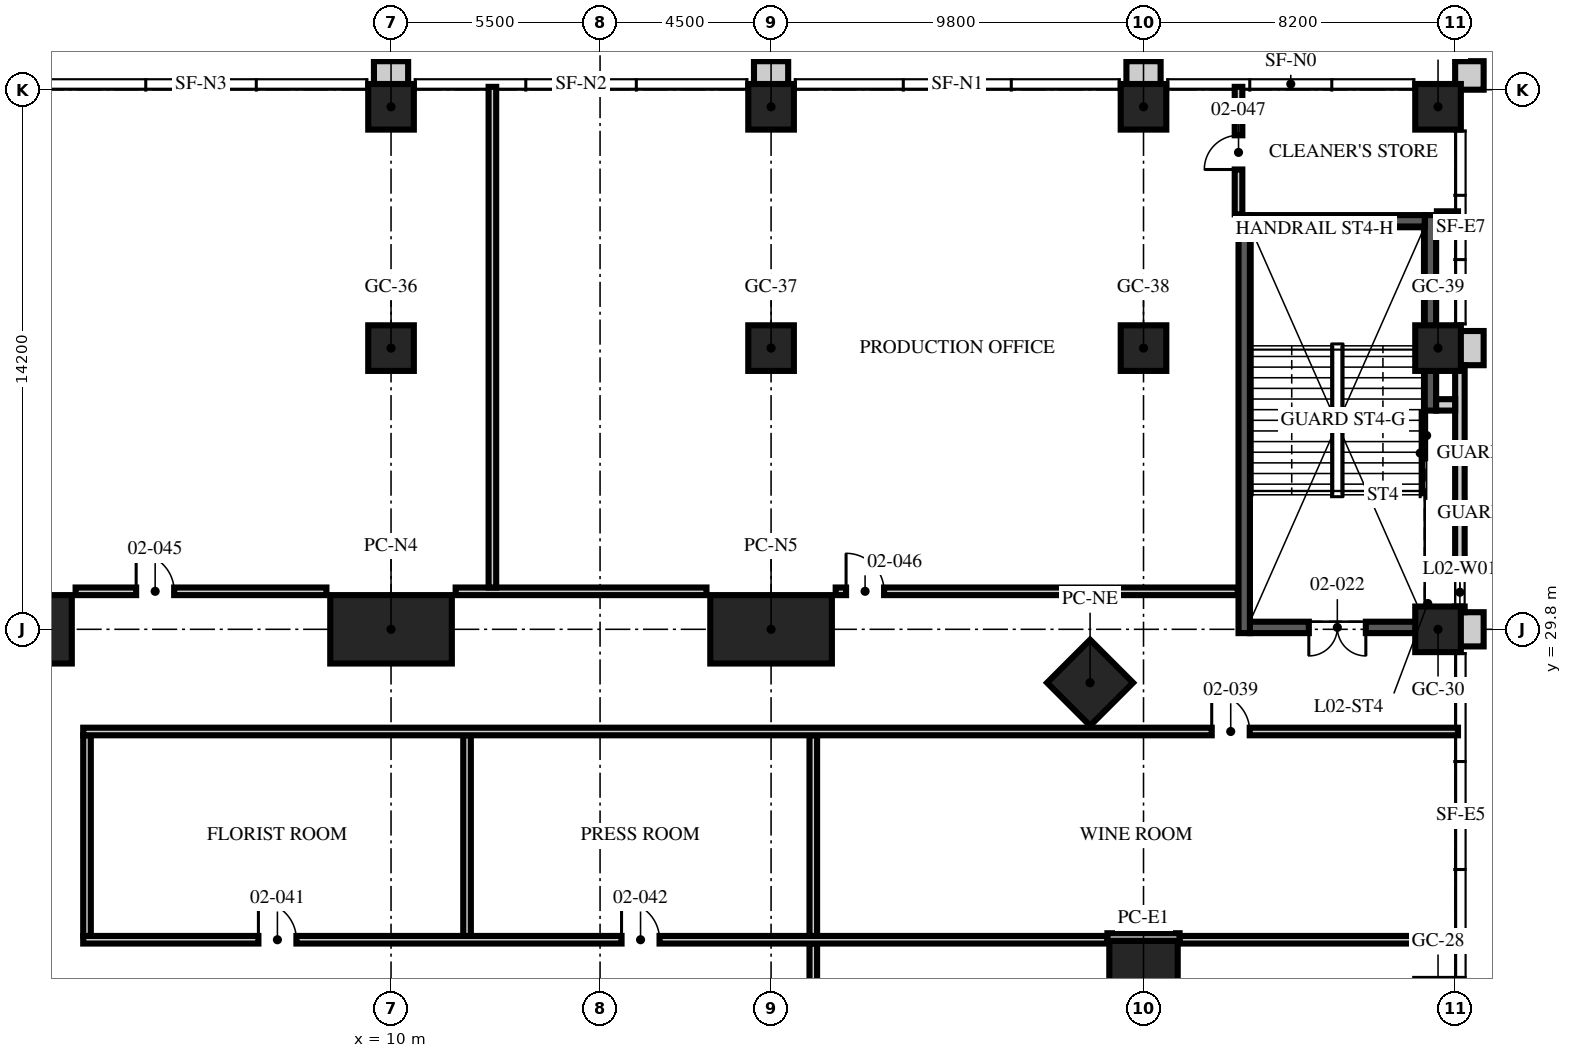
"""IFC4 building model, lengths in metres.
Left out: names, types, materials, properties, quantities, classifications, styles, units other than length and angle.
Written with IfcOpenShell. Run it as: python <this file> out.ifc"""

import sys

from ifc_helpers import new_model, si_unit, direction, frame, frame_2d, origin, origin_2d, place, context, subcontext, project, spatial, rectangle, hollow_rectangle, extrude, element, fill, save


model = new_model("IFC4")
c1 = context("Model", 3, precision=1e-05, world=origin(), true_north=direction((0.0, 1.0)))
c2 = subcontext(c1, "Body", "Model", "MODEL_VIEW")
j1 = project(units=[si_unit("LENGTHUNIT", "METRE"), si_unit("PLANEANGLEUNIT", "RADIAN")], contexts=[c1])
p1 = place(None, origin())
s1 = spatial("IfcSite", under=j1, at=p1, CompositionType="ELEMENT")
p2 = place(p1, origin())
s2 = spatial("IfcBuilding", under=s1, at=p2, CompositionType="ELEMENT")
p3 = place(p2, frame((0.0, 0.0, 11.0)))
s3 = spatial("IfcBuildingStorey", under=s2, at=p3, CompositionType="ELEMENT", Elevation=11.0)
for number, where, z_axis, x_axis in (
    (1, (0.0, 29.8, 0.0), (0.0, 0.0, 1.0), (1.0, 0.0, 0.0)),
    (2, (10.0, 29.8, 0.0), (0.0, 0.0, 1.0), (1.0, 0.0, 0.0)),
    (3, (20.0, 29.8, 0.0), (0.0, 0.0, 1.0), (1.0, 0.0, 0.0)),
    (4, (29.8, 20.0, 0.0), (0.0, 0.0, 1.0), (0.0, 1.0, 0.0)),
):
    element("IfcColumn", number, at=place(p3, frame(where, z_axis=z_axis, x_axis=x_axis)), inside=s3, PredefinedType="COLUMN", context=c2, shape_type="SweptSolid", body=[
        extrude(hollow_rectangle(XDim=3.2, YDim=1.8, WallThickness=0.2, at=origin_2d()), origin(), (0.0, 0.0, 1.0), 5.0),
    ])
p4 = place(p3, frame((28.394, 28.394, 0.0), z_axis=(0.0, 0.0, 1.0), x_axis=(0.707106781187, -0.707106781187, 0.0)))
e5 = element("IfcColumn", 5, at=p4, inside=s3, PredefinedType="COLUMN", context=c2, shape_type="SweptSolid", body=[
    extrude(hollow_rectangle(XDim=1.6, YDim=1.6, WallThickness=0.1, at=origin_2d()), origin(), (0.0, 0.0, 1.0), 5.0),
])
for number, where, z_axis, x_axis in (
    (6, (37.55, 29.8, 0.0), (0.0, 0.0, 1.0), (1.0, 0.0, 0.0)),
    (7, (10.0, 37.2, 0.0), (0.0, 0.0, 1.0), (1.0, 0.0, 0.0)),
    (8, (20.0, 37.2, 0.0), (0.0, 0.0, 1.0), (1.0, 0.0, 0.0)),
    (9, (29.8, 37.2, 0.0), (0.0, 0.0, 1.0), (1.0, 0.0, 0.0)),
    (10, (37.55, 37.2, 0.0), (0.0, 0.0, 1.0), (1.0, 0.0, 0.0)),
    (11, (10.0, 43.55, 0.0), (0.0, 0.0, 1.0), (1.0, 0.0, 0.0)),
    (12, (20.0, 43.55, 0.0), (0.0, 0.0, 1.0), (1.0, 0.0, 0.0)),
    (13, (29.8, 43.55, 0.0), (0.0, 0.0, 1.0), (1.0, 0.0, 0.0)),
    (14, (37.55, 43.55, 0.0), (0.0, 0.0, 1.0), (1.0, 0.0, 0.0)),
):
    element("IfcColumn", number, at=place(p3, frame(where, z_axis=z_axis, x_axis=x_axis)), inside=s3, PredefinedType="COLUMN", context=c2, shape_type="SweptSolid", body=[
        extrude(rectangle(XDim=1.2, YDim=1.2, at=origin_2d()), origin(), (0.0, 0.0, 1.0), 5.0),
    ])
for number, where, z_axis, x_axis in (
    (15, (38.375, 29.35, 0.0), (0.0, 0.0, 1.0), (0.0, 1.0, 0.0)),
    (16, (38.375, 36.75, 0.0), (0.0, 0.0, 1.0), (0.0, 1.0, 0.0)),
):
    element("IfcWall", number, at=place(p3, frame(where, z_axis=z_axis, x_axis=x_axis)), inside=s3, PredefinedType="SOLIDWALL", context=c2, shape_type="SweptSolid", body=[
        extrude(rectangle(XDim=0.9, YDim=0.75, at=frame_2d((0.45, 0.0))), origin(), (0.0, 0.0, 1.0), 5.0),
    ])
p5 = place(p3, frame((38.375, 44.0, 0.0), z_axis=(0.0, 0.0, 1.0), x_axis=(0.0, 1.0, 0.0)))
e17 = element("IfcWall", 17, at=p5, inside=s3, PredefinedType="SOLIDWALL", context=c2, shape_type="SweptSolid", body=[
    extrude(rectangle(XDim=0.75, YDim=0.75, at=frame_2d((0.375, 0.0))), origin(), (0.0, 0.0, 1.0), 5.0),
])
p6 = place(p3, frame((38.125, 30.25, 0.0), z_axis=(0.0, 0.0, 1.0), x_axis=(0.0, 1.0, 0.0)))
e18 = element("IfcWall", 18, at=p6, inside=s3, PredefinedType="SOLIDWALL", context=c2, shape_type="SweptSolid", body=[
    extrude(rectangle(XDim=6.5, YDim=0.25, at=frame_2d((3.25, 0.0))), origin(), (0.0, 0.0, 1.0), 5.0),
])
p7 = place(p6, frame((0.15, 0.0, 1.2)))
e19 = element("IfcOpeningElement", 19, at=p7, cuts=e18, PredefinedType="OPENING", context=c2, shape_type="SweptSolid", body=[
    extrude(rectangle(XDim=0.75, YDim=1.7, at=frame_2d((0.375, 0.85))), frame((0.0, 0.135, 0.0), z_axis=(0.0, -1.0, 0.0), x_axis=(1.0, 0.0, 0.0)), (0.0, 0.0, 1.0), 0.27),
])
for number, where, z_axis, x_axis in (
    (20, (30.25, 44.375, 0.0), (0.0, 0.0, 1.0), (-1.0, 0.0, 0.0)),
    (21, (20.45, 44.375, 0.0), (0.0, 0.0, 1.0), (-1.0, 0.0, 0.0)),
    (22, (10.45, 44.375, 0.0), (0.0, 0.0, 1.0), (-1.0, 0.0, 0.0)),
):
    element("IfcWall", number, at=place(p3, frame(where, z_axis=z_axis, x_axis=x_axis)), inside=s3, PredefinedType="SOLIDWALL", context=c2, shape_type="SweptSolid", body=[
        extrude(rectangle(XDim=0.9, YDim=0.75, at=frame_2d((0.45, 0.0))), origin(), (0.0, 0.0, 1.0), 5.0),
    ])
p8 = place(p3, frame((37.35, 35.556, 0.0), z_axis=(0.0, 0.0, 1.0), x_axis=(0.0, 1.0, 0.0)))
e23 = element("IfcWall", 23, at=p8, inside=s3, PredefinedType="SOLIDWALL", context=c2, shape_type="SweptSolid", body=[
    extrude(rectangle(XDim=5.144, YDim=0.3, at=frame_2d((2.572, 0.0))), origin(), (0.0, 0.0, 1.0), 4.7),
])
p9 = place(p3, frame((38.0, 35.706, 0.0), z_axis=(0.0, 0.0, 1.0), x_axis=(-1.0, 0.0, 0.0)))
e24 = element("IfcWall", 24, at=p9, inside=s3, PredefinedType="PARTITIONING", context=c2, shape_type="SweptSolid", body=[
    extrude(rectangle(XDim=0.5, YDim=0.3, at=frame_2d((0.25, 0.0))), origin(), (0.0, 0.0, 1.0), 3.27),
])
p10 = place(p3, frame((38.0, 29.85, 0.0), z_axis=(0.0, 0.0, 1.0), x_axis=(-1.0, 0.0, 0.0)))
e25 = element("IfcWall", 25, at=p10, inside=s3, PredefinedType="SOLIDWALL", context=c2, shape_type="SweptSolid", body=[
    extrude(rectangle(XDim=5.4, YDim=0.3, at=frame_2d((2.7, 0.0))), origin(), (0.0, 0.0, 1.0), 4.7),
])
p11 = place(p10, frame((2.35, 0.0, 0.0)))
e26 = element("IfcOpeningElement", 26, at=p11, cuts=e25, PredefinedType="OPENING", context=c2, shape_type="SweptSolid", body=[
    extrude(rectangle(XDim=1.5, YDim=2.1, at=frame_2d((0.75, 1.05))), frame((0.0, 0.16, 0.0), z_axis=(0.0, -1.0, 0.0), x_axis=(1.0, 0.0, 0.0)), (0.0, 0.0, 1.0), 0.32),
])
p12 = place(p3, frame((32.45, 29.7, 0.0), z_axis=(0.0, 0.0, 1.0), x_axis=(0.0, 1.0, 0.0)))
e27 = element("IfcWall", 27, at=p12, inside=s3, PredefinedType="SOLIDWALL", context=c2, shape_type="SweptSolid", body=[
    extrude(rectangle(XDim=11.0, YDim=0.3, at=frame_2d((5.5, 0.0))), origin(), (0.0, 0.0, 1.0), 4.7),
])
p13 = place(p3, frame((37.2, 40.55, 0.0), z_axis=(0.0, 0.0, 1.0), x_axis=(-1.0, 0.0, 0.0)))
e28 = element("IfcWall", 28, at=p13, inside=s3, PredefinedType="SOLIDWALL", context=c2, shape_type="SweptSolid", body=[
    extrude(rectangle(XDim=4.6, YDim=0.3, at=frame_2d((2.3, 0.0))), origin(), (0.0, 0.0, 1.0), 4.7),
])
p14 = place(p3, frame((21.111, -20.491, 0.0), z_axis=(0.0, 0.0, 1.0), x_axis=(0.0, 1.0, 0.0)))
e29 = element("IfcWall", 29, at=p14, inside=s3, PredefinedType="SOLIDWALL", context=c2, shape_type="SweptSolid", body=[
    extrude(rectangle(XDim=42.022, YDim=0.2, at=frame_2d((21.011, 0.0))), origin(), (0.0, 0.0, 1.0), 3.5),
])
p15 = place(p14, frame((4.88, 0.0, 0.0)))
e30 = element("IfcOpeningElement", 30, at=p15, cuts=e29, PredefinedType="OPENING", context=c2, shape_type="SweptSolid", body=[
    extrude(rectangle(XDim=1.0, YDim=2.1, at=frame_2d((0.5, 1.05))), frame((0.0, 0.11, 0.0), z_axis=(0.0, -1.0, 0.0), x_axis=(1.0, 0.0, 0.0)), (0.0, 0.0, 1.0), 0.22),
])
p16 = place(p14, frame((16.064, 0.0, 0.0)))
e31 = element("IfcOpeningElement", 31, at=p16, cuts=e29, PredefinedType="OPENING", context=c2, shape_type="SweptSolid", body=[
    extrude(rectangle(XDim=1.0, YDim=2.1, at=frame_2d((0.5, 1.05))), frame((0.0, 0.11, 0.0), z_axis=(0.0, -1.0, 0.0), x_axis=(1.0, 0.0, 0.0)), (0.0, 0.0, 1.0), 0.22),
])
p17 = place(p14, frame((31.696, 0.0, 0.0)))
e32 = element("IfcOpeningElement", 32, at=p17, cuts=e29, PredefinedType="OPENING", context=c2, shape_type="SweptSolid", body=[
    extrude(rectangle(XDim=1.0, YDim=2.1, at=frame_2d((0.5, 1.05))), frame((0.0, 0.11, 0.0), z_axis=(0.0, -1.0, 0.0), x_axis=(1.0, 0.0, 0.0)), (0.0, 0.0, 1.0), 0.22),
])
p18 = place(p3, frame((1.9, 21.631, 0.0), z_axis=(0.0, 0.0, 1.0), x_axis=(1.0, 0.0, 0.0)))
e33 = element("IfcWall", 33, at=p18, inside=s3, PredefinedType="SOLIDWALL", context=c2, shape_type="SweptSolid", body=[
    extrude(rectangle(XDim=26.95, YDim=0.2, at=frame_2d((13.475, 0.0))), origin(), (0.0, 0.0, 1.0), 3.5),
])
p19 = place(p18, frame((4.61, 0.0, 0.0)))
e34 = element("IfcOpeningElement", 34, at=p19, cuts=e33, PredefinedType="OPENING", context=c2, shape_type="SweptSolid", body=[
    extrude(rectangle(XDim=1.0, YDim=2.1, at=frame_2d((0.5, 1.05))), frame((0.0, 0.11, 0.0), z_axis=(0.0, -1.0, 0.0), x_axis=(1.0, 0.0, 0.0)), (0.0, 0.0, 1.0), 0.22),
])
p20 = place(p18, frame((14.166, 0.0, 0.0)))
e35 = element("IfcOpeningElement", 35, at=p20, cuts=e33, PredefinedType="OPENING", context=c2, shape_type="SweptSolid", body=[
    extrude(rectangle(XDim=1.0, YDim=2.1, at=frame_2d((0.5, 1.05))), frame((0.0, 0.11, 0.0), z_axis=(0.0, -1.0, 0.0), x_axis=(1.0, 0.0, 0.0)), (0.0, 0.0, 1.0), 0.22),
])
p21 = place(p3, frame((30.75, 21.631, 0.0), z_axis=(0.0, 0.0, 1.0), x_axis=(1.0, 0.0, 0.0)))
e36 = element("IfcWall", 36, at=p21, inside=s3, PredefinedType="SOLIDWALL", context=c2, shape_type="SweptSolid", body=[
    extrude(rectangle(XDim=7.325, YDim=0.2, at=frame_2d((3.663, 0.0))), origin(), (0.0, 0.0, 1.0), 3.7),
])
p22 = place(p3, frame((28.85, 21.702, 0.0), z_axis=(0.0, 0.0, 1.0), x_axis=(1.0, 0.0, 0.0)))
e37 = element("IfcWall", 37, at=p22, inside=s3, PredefinedType="SOLIDWALL", context=c2, shape_type="SweptSolid", body=[
    extrude(rectangle(XDim=1.9, YDim=0.2, at=frame_2d((0.95, 0.0))), origin(), (0.0, 0.0, 1.0), 3.7),
])
for number, where, z_axis, x_axis in (
    (38, (2.0, 21.731, 0.0), (0.0, 0.0, 1.0), (0.0, 1.0, 0.0)),
    (39, (12.0, 21.731, 0.0), (0.0, 0.0, 1.0), (0.0, 1.0, 0.0)),
    (40, (21.111, 21.731, 0.0), (0.0, 0.0, 1.0), (0.0, 1.0, 0.0)),
):
    element("IfcWall", number, at=place(p3, frame(where, z_axis=z_axis, x_axis=x_axis)), inside=s3, PredefinedType="SOLIDWALL", context=c2, shape_type="SweptSolid", body=[
        extrude(rectangle(XDim=5.28, YDim=0.2, at=frame_2d((2.64, 0.0))), origin(), (0.0, 0.0, 1.0), 4.7),
    ])
p23 = place(p3, frame((1.9, 27.111, 0.0), z_axis=(0.0, 0.0, 1.0), x_axis=(1.0, 0.0, 0.0)))
e41 = element("IfcWall", 41, at=p23, inside=s3, PredefinedType="SOLIDWALL", context=c2, shape_type="SweptSolid", body=[
    extrude(rectangle(XDim=36.175, YDim=0.2, at=frame_2d((18.087, 0.0))), origin(), (0.0, 0.0, 1.0), 3.5),
])
p24 = place(p23, frame((29.695, 0.0, 0.0)))
e42 = element("IfcOpeningElement", 42, at=p24, cuts=e41, PredefinedType="OPENING", context=c2, shape_type="SweptSolid", body=[
    extrude(rectangle(XDim=1.0, YDim=2.1, at=frame_2d((0.5, 1.05))), frame((0.0, 0.11, 0.0), z_axis=(0.0, -1.0, 0.0), x_axis=(1.0, 0.0, 0.0)), (0.0, 0.0, 1.0), 0.22),
])
p25 = place(p3, frame((1.7, 30.8, 0.0), z_axis=(0.0, 0.0, 1.0), x_axis=(1.0, 0.0, 0.0)))
e43 = element("IfcWall", 43, at=p25, inside=s3, PredefinedType="SOLIDWALL", context=c2, shape_type="SweptSolid", body=[
    extrude(rectangle(XDim=6.6, YDim=0.2, at=frame_2d((3.3, 0.0))), origin(), (0.0, 0.0, 1.0), 4.7),
])
p26 = place(p25, frame((1.593, 0.0, 0.0)))
e44 = element("IfcOpeningElement", 44, at=p26, cuts=e43, PredefinedType="OPENING", context=c2, shape_type="SweptSolid", body=[
    extrude(rectangle(XDim=1.0, YDim=2.1, at=frame_2d((0.5, 1.05))), frame((0.0, 0.11, 0.0), z_axis=(0.0, -1.0, 0.0), x_axis=(1.0, 0.0, 0.0)), (0.0, 0.0, 1.0), 0.22),
])
p27 = place(p3, frame((11.7, 30.8, 0.0), z_axis=(0.0, 0.0, 1.0), x_axis=(1.0, 0.0, 0.0)))
e45 = element("IfcWall", 45, at=p27, inside=s3, PredefinedType="SOLIDWALL", context=c2, shape_type="SweptSolid", body=[
    extrude(rectangle(XDim=6.6, YDim=0.2, at=frame_2d((3.3, 0.0))), origin(), (0.0, 0.0, 1.0), 4.7),
])
p28 = place(p3, frame((21.7, 30.8, 0.0), z_axis=(0.0, 0.0, 1.0), x_axis=(1.0, 0.0, 0.0)))
e46 = element("IfcWall", 46, at=p28, inside=s3, PredefinedType="SOLIDWALL", context=c2, shape_type="SweptSolid", body=[
    extrude(rectangle(XDim=10.58, YDim=0.2, at=frame_2d((5.29, 0.0))), origin(), (0.0, 0.0, 1.0), 4.7),
])
p29 = place(p28, frame((0.273, 0.0, 0.0)))
e47 = element("IfcOpeningElement", 47, at=p29, cuts=e46, PredefinedType="OPENING", context=c2, shape_type="SweptSolid", body=[
    extrude(rectangle(XDim=1.0, YDim=2.1, at=frame_2d((0.5, 1.05))), frame((0.0, 0.11, 0.0), z_axis=(0.0, -1.0, 0.0), x_axis=(1.0, 0.0, 0.0)), (0.0, 0.0, 1.0), 0.22),
])
p30 = place(p3, frame((12.667, 30.9, 0.0), z_axis=(0.0, 0.0, 1.0), x_axis=(0.0, 1.0, 0.0)))
e48 = element("IfcWall", 48, at=p30, inside=s3, PredefinedType="SOLIDWALL", context=c2, shape_type="SweptSolid", body=[
    extrude(rectangle(XDim=13.175, YDim=0.2, at=frame_2d((6.587, 0.0))), origin(), (0.0, 0.0, 1.0), 3.7),
])
p31 = place(p3, frame((37.52, 40.7, 0.0), z_axis=(0.0, 0.0, 1.0), x_axis=(1.0, 0.0, 0.0)))
e49 = element("IfcWall", 49, at=p31, inside=s3, PredefinedType="SOLIDWALL", context=c2, shape_type="SweptSolid", body=[
    extrude(rectangle(XDim=0.555, YDim=0.2, at=frame_2d((0.277, 0.0))), origin(), (0.0, 0.0, 1.0), 3.27),
])
p32 = place(p3, frame((32.3, 40.72, 0.0), z_axis=(0.0, 0.0, 1.0), x_axis=(0.0, 1.0, 0.0)))
e50 = element("IfcWall", 50, at=p32, inside=s3, PredefinedType="SOLIDWALL", context=c2, shape_type="SweptSolid", body=[
    extrude(rectangle(XDim=3.355, YDim=0.2, at=frame_2d((1.677, 0.0))), origin(), (0.0, 0.0, 1.0), 3.7),
])
p33 = place(p32, frame((1.18, 0.0, 0.0)))
e51 = element("IfcOpeningElement", 51, at=p33, cuts=e50, PredefinedType="OPENING", context=c2, shape_type="SweptSolid", body=[
    extrude(rectangle(XDim=0.9, YDim=2.1, at=frame_2d((0.45, 1.05))), frame((0.0, 0.11, 0.0), z_axis=(0.0, -1.0, 0.0), x_axis=(1.0, 0.0, 0.0)), (0.0, 0.0, 1.0), 0.22),
])
p34 = place(p7, origin())
e52 = element("IfcWindow", 52, at=p34, inside=s3, PartitioningType="SINGLE_PANEL", PredefinedType="WINDOW", context=c2, shape_type="SweptSolid", body=[
    extrude(rectangle(XDim=0.75, YDim=1.7, at=frame_2d((0.375, 0.85))), frame((0.0, 0.03, 0.0), z_axis=(0.0, -1.0, 0.0), x_axis=(1.0, 0.0, 0.0)), (0.0, 0.0, 1.0), 0.06),
])
fill(e19, e52)
p35 = place(p11, origin())
e53 = element("IfcDoor", 53, at=p35, inside=s3, OperationType="DOUBLE_DOOR_SINGLE_SWING", PredefinedType="DOOR", context=c2, shape_type="SweptSolid", body=[
    extrude(rectangle(XDim=1.5, YDim=2.1, at=frame_2d((0.75, 1.05))), frame((0.0, 0.025, 0.0), z_axis=(0.0, -1.0, 0.0), x_axis=(1.0, 0.0, 0.0)), (0.0, 0.0, 1.0), 0.05),
])
fill(e26, e53)
p36 = place(p24, origin())
e54 = element("IfcDoor", 54, at=p36, inside=s3, OperationType="SINGLE_SWING_LEFT", PredefinedType="DOOR", context=c2, shape_type="SweptSolid", body=[
    extrude(rectangle(XDim=1.0, YDim=2.1, at=frame_2d((0.5, 1.05))), frame((0.0, 0.025, 0.0), z_axis=(0.0, -1.0, 0.0), x_axis=(1.0, 0.0, 0.0)), (0.0, 0.0, 1.0), 0.05),
])
fill(e42, e54)
p37 = place(p19, origin())
e55 = element("IfcDoor", 55, at=p37, inside=s3, OperationType="SINGLE_SWING_LEFT", PredefinedType="DOOR", context=c2, shape_type="SweptSolid", body=[
    extrude(rectangle(XDim=1.0, YDim=2.1, at=frame_2d((0.5, 1.05))), frame((0.0, 0.025, 0.0), z_axis=(0.0, -1.0, 0.0), x_axis=(1.0, 0.0, 0.0)), (0.0, 0.0, 1.0), 0.05),
])
fill(e34, e55)
p38 = place(p20, origin())
e56 = element("IfcDoor", 56, at=p38, inside=s3, OperationType="SINGLE_SWING_LEFT", PredefinedType="DOOR", context=c2, shape_type="SweptSolid", body=[
    extrude(rectangle(XDim=1.0, YDim=2.1, at=frame_2d((0.5, 1.05))), frame((0.0, 0.025, 0.0), z_axis=(0.0, -1.0, 0.0), x_axis=(1.0, 0.0, 0.0)), (0.0, 0.0, 1.0), 0.05),
])
fill(e35, e56)
p39 = place(p26, origin())
e57 = element("IfcDoor", 57, at=p39, inside=s3, OperationType="SINGLE_SWING_LEFT", PredefinedType="DOOR", context=c2, shape_type="SweptSolid", body=[
    extrude(rectangle(XDim=1.0, YDim=2.1, at=frame_2d((0.5, 1.05))), frame((0.0, 0.025, 0.0), z_axis=(0.0, -1.0, 0.0), x_axis=(1.0, 0.0, 0.0)), (0.0, 0.0, 1.0), 0.05),
])
fill(e44, e57)
p40 = place(p29, origin())
e58 = element("IfcDoor", 58, at=p40, inside=s3, OperationType="SINGLE_SWING_LEFT", PredefinedType="DOOR", context=c2, shape_type="SweptSolid", body=[
    extrude(rectangle(XDim=1.0, YDim=2.1, at=frame_2d((0.5, 1.05))), frame((0.0, 0.025, 0.0), z_axis=(0.0, -1.0, 0.0), x_axis=(1.0, 0.0, 0.0)), (0.0, 0.0, 1.0), 0.05),
])
fill(e47, e58)
p41 = place(p33, origin())
e59 = element("IfcDoor", 59, at=p41, inside=s3, OperationType="SINGLE_SWING_LEFT", PredefinedType="DOOR", context=c2, shape_type="SweptSolid", body=[
    extrude(rectangle(XDim=0.9, YDim=2.1, at=frame_2d((0.45, 1.05))), frame((0.0, 0.025, 0.0), z_axis=(0.0, -1.0, 0.0), x_axis=(1.0, 0.0, 0.0)), (0.0, 0.0, 1.0), 0.05),
])
fill(e51, e59)
save(model, sys.argv[1])
